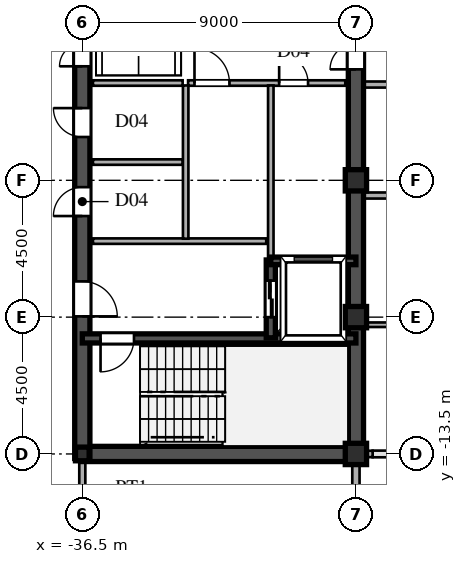
"""IFC4 building model, lengths in metres.
Left out: names, types, materials, properties, quantities, classifications, styles, units other than length and angle.
Written with IfcOpenShell. Run it as: python <this file> out.ifc"""

import sys

from ifc_helpers import new_model, si_unit, direction, frame, frame_2d, origin, origin_2d, place, context, subcontext, project, spatial, rectangle, hollow_rectangle, i_section, extrude, source, transform, mapped, element, fill, save


model = new_model("IFC4")
c1 = context("Model", 3, precision=1e-05, world=origin(), true_north=direction((0.0, 1.0)))
c2 = subcontext(c1, "Body", "Model", "MODEL_VIEW")
j1 = project(units=[si_unit("LENGTHUNIT", "METRE"), si_unit("PLANEANGLEUNIT", "RADIAN")], contexts=[c1])
p1 = place(None, origin())
s1 = spatial("IfcSite", under=j1, at=p1, CompositionType="ELEMENT")
p2 = place(p1, origin())
s2 = spatial("IfcBuilding", under=s1, at=p2, CompositionType="ELEMENT")
p3 = place(p2, frame((0.0, 0.0, 243.15)))
s3 = spatial("IfcBuildingStorey", under=s2, at=p3, CompositionType="ELEMENT", Elevation=243.15)
m1 = source(origin(), c2, "Body", "SweptSolid", [
    extrude(hollow_rectangle(XDim=0.7, YDim=0.7, WallThickness=0.03, at=origin_2d()), origin(), (0.0, 0.0, 1.0), 3.75),
])
for number, where, z_axis, x_axis in (
    (1, (-27.5, -13.5, 0.0), (0.0, 0.0, 1.0), (1.0, 0.0, 0.0)),
    (2, (-27.5, -9.0, 0.0), (0.0, 0.0, 1.0), (1.0, 0.0, 0.0)),
    (3, (-27.5, -4.5, 0.0), (0.0, 0.0, 1.0), (1.0, 0.0, 0.0)),
):
    element("IfcColumn", number, at=place(p3, frame(where, z_axis=z_axis, x_axis=x_axis)), inside=s3, PredefinedType="COLUMN", context=c2, shape_type="MappedRepresentation", body=[
        mapped(m1, transform((0.0, 0.0, 0.0), scale=1.0)),
    ])
m2 = source(origin(), c2, "Body", "SweptSolid", [
    extrude(i_section(OverallWidth=0.45, OverallDepth=0.45, WebThickness=0.016, FlangeThickness=0.025, at=origin_2d()), origin(), (0.0, 0.0, 1.0), 3.75),
])
p4 = place(p3, frame((-36.5, -13.5, 0.0), z_axis=(0.0, 0.0, 1.0), x_axis=(1.0, 0.0, 0.0)))
e4 = element("IfcColumn", 4, at=p4, inside=s3, PredefinedType="COLUMN", context=c2, shape_type="MappedRepresentation", body=[
    mapped(m2, transform((0.0, 0.0, 0.0), scale=1.0)),
])
p5 = place(p3, frame((-27.5, -15.98, 0.0), z_axis=(0.0, 0.0, 1.0), x_axis=(0.0, 1.0, 0.0)))
e5 = element("IfcWall", 5, at=p5, inside=s3, PredefinedType="SOLIDWALL", context=c2, shape_type="SweptSolid", body=[
    extrude(rectangle(XDim=1.605, YDim=0.24, at=frame_2d((0.803, 0.0))), origin(), (0.0, 0.0, 1.0), 3.53),
])
p6 = place(p3, frame((-27.5, -14.375, 0.0), z_axis=(0.0, 0.0, 1.0), x_axis=(0.0, 1.0, 0.0)))
e6 = element("IfcWall", 6, at=p6, inside=s3, PredefinedType="SOLIDWALL", context=c2, shape_type="SweptSolid", body=[
    extrude(rectangle(XDim=0.62, YDim=0.24, at=frame_2d((0.31, 0.0))), origin(), (0.0, 0.0, 1.0), 3.03),
])
p7 = place(p3, frame((-27.49, -13.5, 0.0), z_axis=(0.0, 0.0, 1.0), x_axis=(1.0, 0.0, 0.0)))
e7 = element("IfcWall", 7, at=p7, inside=s3, PredefinedType="SOLIDWALL", context=c2, shape_type="SweptSolid", body=[
    extrude(rectangle(XDim=0.54, YDim=0.21, at=frame_2d((0.27, 0.0))), origin(), (0.0, 0.0, 1.0), 3.03),
])
p8 = place(p3, frame((-27.5, -13.5, 0.0), z_axis=(0.0, 0.0, 1.0), x_axis=(0.0, 1.0, 0.0)))
e8 = element("IfcWall", 8, at=p8, inside=s3, PredefinedType="SHEAR", context=c2, shape_type="SweptSolid", body=[
    extrude(rectangle(XDim=12.2, YDim=0.5, at=frame_2d((6.1, 0.0))), origin(), (0.0, 0.0, 1.0), 3.53),
])
p9 = place(p3, frame((-27.5, -1.3, 0.0), z_axis=(0.0, 0.0, 1.0), x_axis=(0.0, 1.0, 0.0)))
e9 = element("IfcWall", 9, at=p9, inside=s3, PredefinedType="SHEAR", context=c2, shape_type="SweptSolid", body=[
    extrude(rectangle(XDim=2.6, YDim=0.5, at=frame_2d((1.3, 0.0))), origin(), (0.0, 0.0, 1.0), 3.53),
])
p10 = place(p9, frame((0.45, 0.0, 0.0)))
e10 = element("IfcOpeningElement", 10, at=p10, cuts=e9, PredefinedType="OPENING", context=c2, shape_type="SweptSolid", body=[
    extrude(rectangle(XDim=1.7, YDim=2.35, at=frame_2d((0.85, 1.175))), frame((0.0, 0.26, 0.0), z_axis=(0.0, -1.0, 0.0), x_axis=(1.0, 0.0, 0.0)), (0.0, 0.0, 1.0), 0.52),
])
p11 = place(p3, frame((-36.5, -13.5, 0.0), z_axis=(0.0, 0.0, 1.0), x_axis=(1.0, 0.0, 0.0)))
e11 = element("IfcWall", 11, at=p11, inside=s3, PredefinedType="SHEAR", context=c2, shape_type="SweptSolid", body=[
    extrude(rectangle(XDim=9.0, YDim=0.5, at=frame_2d((4.5, 0.0))), origin(), (0.0, 0.0, 1.0), 3.53),
])
p12 = place(p3, frame((-36.5, -13.65, 0.0), z_axis=(0.0, 0.0, 1.0), x_axis=(0.0, 1.0, 0.0)))
e12 = element("IfcWall", 12, at=p12, inside=s3, PredefinedType="SHEAR", context=c2, shape_type="SweptSolid", body=[
    extrude(rectangle(XDim=7.15, YDim=0.5, at=frame_2d((3.575, 0.0))), origin(), (0.0, 0.0, 1.0), 3.53),
])
p13 = place(p12, frame((4.675, 0.0, 0.0)))
e13 = element("IfcOpeningElement", 13, at=p13, cuts=e12, PredefinedType="OPENING", context=c2, shape_type="SweptSolid", body=[
    extrude(rectangle(XDim=1.15, YDim=2.2, at=frame_2d((0.575, 1.1))), frame((0.0, 0.26, 0.0), z_axis=(0.0, -1.0, 0.0), x_axis=(1.0, 0.0, 0.0)), (0.0, 0.0, 1.0), 0.52),
])
p14 = place(p3, frame((-36.5, -1.3, 0.0), z_axis=(0.0, 0.0, 1.0), x_axis=(0.0, 1.0, 0.0)))
e14 = element("IfcWall", 14, at=p14, inside=s3, PredefinedType="SHEAR", context=c2, shape_type="SweptSolid", body=[
    extrude(rectangle(XDim=2.6, YDim=0.5, at=frame_2d((1.3, 0.0))), origin(), (0.0, 0.0, 1.0), 3.53),
])
p15 = place(p14, frame((0.55, 0.0, 0.0)))
e15 = element("IfcOpeningElement", 15, at=p15, cuts=e14, PredefinedType="OPENING", context=c2, shape_type="SweptSolid", body=[
    extrude(rectangle(XDim=1.5, YDim=2.3, at=frame_2d((0.75, 1.15))), frame((0.0, 0.26, 0.0), z_axis=(0.0, -1.0, 0.0), x_axis=(1.0, 0.0, 0.0)), (0.0, 0.0, 1.0), 0.52),
])
p16 = place(p3, frame((-36.5, -6.5, 0.0), z_axis=(0.0, 0.0, 1.0), x_axis=(0.0, 1.0, 0.0)))
e16 = element("IfcWall", 16, at=p16, inside=s3, PredefinedType="SHEAR", context=c2, shape_type="SweptSolid", body=[
    extrude(rectangle(XDim=2.6, YDim=0.5, at=frame_2d((1.3, 0.0))), origin(), (0.0, 0.0, 1.0), 3.53),
])
p17 = place(p16, frame((0.825, 0.0, 0.0)))
e17 = element("IfcOpeningElement", 17, at=p17, cuts=e16, PredefinedType="OPENING", context=c2, shape_type="SweptSolid", body=[
    extrude(rectangle(XDim=0.95, YDim=2.15, at=frame_2d((0.475, 1.075))), frame((0.0, 0.26, 0.0), z_axis=(0.0, -1.0, 0.0), x_axis=(1.0, 0.0, 0.0)), (0.0, 0.0, 1.0), 0.52),
])
p18 = place(p3, frame((-36.5, -3.9, 0.0), z_axis=(0.0, 0.0, 1.0), x_axis=(0.0, 1.0, 0.0)))
e18 = element("IfcWall", 18, at=p18, inside=s3, PredefinedType="SHEAR", context=c2, shape_type="SweptSolid", body=[
    extrude(rectangle(XDim=2.6, YDim=0.5, at=frame_2d((1.3, 0.0))), origin(), (0.0, 0.0, 1.0), 3.53),
])
p19 = place(p18, frame((0.825, 0.0, 0.0)))
e19 = element("IfcOpeningElement", 19, at=p19, cuts=e18, PredefinedType="OPENING", context=c2, shape_type="SweptSolid", body=[
    extrude(rectangle(XDim=0.95, YDim=2.15, at=frame_2d((0.475, 1.075))), frame((0.0, 0.26, 0.0), z_axis=(0.0, -1.0, 0.0), x_axis=(1.0, 0.0, 0.0)), (0.0, 0.0, 1.0), 0.52),
])
p20 = place(p3, frame((-36.5, -9.7, 0.0), z_axis=(0.0, 0.0, 1.0), x_axis=(1.0, 0.0, 0.0)))
e20 = element("IfcWall", 20, at=p20, inside=s3, PredefinedType="SHEAR", context=c2, shape_type="SweptSolid", body=[
    extrude(rectangle(XDim=9.0, YDim=0.3, at=frame_2d((4.5, 0.0))), origin(), (0.0, 0.0, 1.0), 3.53),
])
p21 = place(p20, frame((0.6, 0.0, 0.0)))
e21 = element("IfcOpeningElement", 21, at=p21, cuts=e20, PredefinedType="OPENING", context=c2, shape_type="SweptSolid", body=[
    extrude(rectangle(XDim=1.1, YDim=2.2, at=frame_2d((0.55, 1.1))), frame((0.0, 0.16, 0.0), z_axis=(0.0, -1.0, 0.0), x_axis=(1.0, 0.0, 0.0)), (0.0, 0.0, 1.0), 0.32),
])
p22 = place(p3, frame((-30.3, -7.15, 0.0), z_axis=(0.0, 0.0, 1.0), x_axis=(1.0, 0.0, 0.0)))
e22 = element("IfcWall", 22, at=p22, inside=s3, PredefinedType="SHEAR", context=c2, shape_type="SweptSolid", body=[
    extrude(rectangle(XDim=2.8, YDim=0.25, at=frame_2d((1.4, 0.0))), origin(), (0.0, 0.0, 1.0), 3.53),
])
p23 = place(p3, frame((-30.3, -9.68, 0.0), z_axis=(0.0, 0.0, 1.0), x_axis=(0.0, 1.0, 0.0)))
e23 = element("IfcWall", 23, at=p23, inside=s3, PredefinedType="SHEAR", context=c2, shape_type="SweptSolid", body=[
    extrude(rectangle(XDim=2.56, YDim=0.3, at=frame_2d((1.28, 0.0))), origin(), (0.0, 0.0, 1.0), 3.53),
])
p24 = place(p23, frame((0.68, 0.0, 0.0)))
e24 = element("IfcOpeningElement", 24, at=p24, cuts=e23, PredefinedType="OPENING", context=c2, shape_type="SweptSolid", body=[
    extrude(rectangle(XDim=1.2, YDim=2.25, at=frame_2d((0.6, 1.125))), frame((0.0, 0.16, 0.0), z_axis=(0.0, -1.0, 0.0), x_axis=(1.0, 0.0, 0.0)), (0.0, 0.0, 1.0), 0.32),
])
p25 = place(p3, frame((-36.15, -6.5, 0.0), z_axis=(0.0, 0.0, 1.0), x_axis=(1.0, 0.0, 0.0)))
e25 = element("IfcWall", 25, at=p25, inside=s3, PredefinedType="PARTITIONING", context=c2, shape_type="SweptSolid", body=[
    extrude(rectangle(XDim=5.7, YDim=0.18, at=frame_2d((2.85, 0.0))), origin(), (0.0, 0.0, 1.0), 3.53),
])
p26 = place(p3, frame((-33.1, -6.42, 0.0), z_axis=(0.0, 0.0, 1.0), x_axis=(0.0, 1.0, 0.0)))
e26 = element("IfcWall", 26, at=p26, inside=s3, PredefinedType="PARTITIONING", context=c2, shape_type="SweptSolid", body=[
    extrude(rectangle(XDim=5.04, YDim=0.18, at=frame_2d((2.52, 0.0))), origin(), (0.0, 0.0, 1.0), 3.53),
])
p27 = place(p3, frame((-30.3, -1.3, 0.0), z_axis=(0.0, 0.0, 1.0), x_axis=(1.0, 0.0, 0.0)))
e27 = element("IfcWall", 27, at=p27, inside=s3, PredefinedType="PARTITIONING", context=c2, shape_type="SweptSolid", body=[
    extrude(rectangle(XDim=2.45, YDim=0.18, at=frame_2d((1.225, 0.0))), origin(), (0.0, 0.0, 1.0), 3.53),
])
p28 = place(p27, frame((0.275, 0.0, 0.0)))
e28 = element("IfcOpeningElement", 28, at=p28, cuts=e27, PredefinedType="OPENING", context=c2, shape_type="SweptSolid", body=[
    extrude(rectangle(XDim=0.95, YDim=2.15, at=frame_2d((0.475, 1.075))), frame((0.0, 0.1, 0.0), z_axis=(0.0, -1.0, 0.0), x_axis=(1.0, 0.0, 0.0)), (0.0, 0.0, 1.0), 0.2),
])
p29 = place(p3, frame((-33.02, -1.3, 0.0), z_axis=(0.0, 0.0, 1.0), x_axis=(1.0, 0.0, 0.0)))
e29 = element("IfcWall", 29, at=p29, inside=s3, PredefinedType="PARTITIONING", context=c2, shape_type="SweptSolid", body=[
    extrude(rectangle(XDim=2.72, YDim=0.18, at=frame_2d((1.36, 0.0))), origin(), (0.0, 0.0, 1.0), 3.53),
])
p30 = place(p29, frame((0.21, 0.0, 0.0)))
e30 = element("IfcOpeningElement", 30, at=p30, cuts=e29, PredefinedType="OPENING", context=c2, shape_type="SweptSolid", body=[
    extrude(rectangle(XDim=1.15, YDim=2.2, at=frame_2d((0.575, 1.1))), frame((0.0, 0.1, 0.0), z_axis=(0.0, -1.0, 0.0), x_axis=(1.0, 0.0, 0.0)), (0.0, 0.0, 1.0), 0.2),
])
p31 = place(p3, frame((-30.3, -7.12, 0.0), z_axis=(0.0, 0.0, 1.0), x_axis=(0.0, 1.0, 0.0)))
e31 = element("IfcWall", 31, at=p31, inside=s3, PredefinedType="PARTITIONING", context=c2, shape_type="SweptSolid", body=[
    extrude(rectangle(XDim=5.74, YDim=0.18, at=frame_2d((2.87, 0.0))), origin(), (0.0, 0.0, 1.0), 3.53),
])
for number, where, z_axis, x_axis in (
    (32, (-36.15, -1.3, 0.0), (0.0, 0.0, 1.0), (1.0, 0.0, 0.0)),
    (33, (-36.15, -3.9, 0.0), (0.0, 0.0, 1.0), (1.0, 0.0, 0.0)),
):
    element("IfcWall", number, at=place(p3, frame(where, z_axis=z_axis, x_axis=x_axis)), inside=s3, PredefinedType="PARTITIONING", context=c2, shape_type="SweptSolid", body=[
        extrude(rectangle(XDim=2.95, YDim=0.18, at=frame_2d((1.475, 0.0))), origin(), (0.0, 0.0, 1.0), 3.53),
    ])
p32 = place(p3, frame((-27.245, -9.25, 0.0), z_axis=(0.0, 0.0, 1.0), x_axis=(1.0, 0.0, 0.0)))
e34 = element("IfcWall", 34, at=p32, inside=s3, PredefinedType="PARTITIONING", context=c2, shape_type="SweptSolid", body=[
    extrude(rectangle(XDim=6.66, YDim=0.15, at=frame_2d((3.33, 0.0))), origin(), (0.0, 0.0, 1.0), 3.53),
])
p33 = place(p32, frame((3.07, 0.0, 0.0)))
e35 = element("IfcOpeningElement", 35, at=p33, cuts=e34, PredefinedType="OPENING", context=c2, shape_type="SweptSolid", body=[
    extrude(rectangle(XDim=0.95, YDim=2.15, at=frame_2d((0.475, 1.075))), frame((0.0, 0.085, 0.0), z_axis=(0.0, -1.0, 0.0), x_axis=(1.0, 0.0, 0.0)), (0.0, 0.0, 1.0), 0.17),
])
p34 = place(p3, frame((-27.245, -5.0, 0.0), z_axis=(0.0, 0.0, 1.0), x_axis=(1.0, 0.0, 0.0)))
e36 = element("IfcWall", 36, at=p34, inside=s3, PredefinedType="PARTITIONING", context=c2, shape_type="SweptSolid", body=[
    extrude(rectangle(XDim=54.49, YDim=0.2, at=frame_2d((27.245, 0.0))), origin(), (0.0, 0.0, 1.0), 3.53),
])
p35 = place(p34, frame((23.47, 0.0, 0.0)))
e37 = element("IfcOpeningElement", 37, at=p35, cuts=e36, PredefinedType="OPENING", context=c2, shape_type="SweptSolid", body=[
    extrude(rectangle(XDim=1.05, YDim=2.25, at=frame_2d((0.525, 1.125))), frame((0.0, 0.11, 0.0), z_axis=(0.0, -1.0, 0.0), x_axis=(1.0, 0.0, 0.0)), (0.0, 0.0, 1.0), 0.22),
])
p36 = place(p3, frame((-27.245, -1.35, 0.0), z_axis=(0.0, 0.0, 1.0), x_axis=(1.0, 0.0, 0.0)))
e38 = element("IfcWall", 38, at=p36, inside=s3, PredefinedType="PARTITIONING", context=c2, shape_type="SweptSolid", body=[
    extrude(rectangle(XDim=19.86, YDim=0.2, at=frame_2d((9.93, 0.0))), origin(), (0.0, 0.0, 1.0), 3.53),
])
p37 = place(p36, frame((12.97, 0.0, 0.0)))
e39 = element("IfcOpeningElement", 39, at=p37, cuts=e38, PredefinedType="OPENING", context=c2, shape_type="SweptSolid", body=[
    extrude(rectangle(XDim=1.05, YDim=2.25, at=frame_2d((0.525, 1.125))), frame((0.0, 0.11, 0.0), z_axis=(0.0, -1.0, 0.0), x_axis=(1.0, 0.0, 0.0)), (0.0, 0.0, 1.0), 0.22),
])
p38 = place(p3, frame((-36.5, -15.515, 0.0), z_axis=(0.0, 0.0, 1.0), x_axis=(0.0, 1.0, 0.0)))
e40 = element("IfcWall", 40, at=p38, inside=s3, PredefinedType="PARTITIONING", context=c2, shape_type="SweptSolid", body=[
    extrude(rectangle(XDim=1.76, YDim=0.2, at=frame_2d((0.88, 0.0))), origin(), (0.0, 0.0, 1.0), 2.93),
])
m3 = source(origin(), c2, "Body", "SweptSolid", [
    extrude(rectangle(XDim=1.7, YDim=2.35, at=frame_2d((0.85, 1.175))), frame((0.0, 0.025, 0.0), z_axis=(0.0, -1.0, 0.0), x_axis=(1.0, 0.0, 0.0)), (0.0, 0.0, 1.0), 0.05),
])
p39 = place(p10, origin())
e41 = element("IfcDoor", 41, at=p39, inside=s3, OperationType="DOUBLE_SWING_LEFT", PredefinedType="DOOR", context=c2, shape_type="MappedRepresentation", body=[
    mapped(m3, transform((0.0, 0.0, 0.0), scale=1.0)),
])
fill(e10, e41)
m4 = source(origin(), c2, "Body", "SweptSolid", [
    extrude(rectangle(XDim=1.15, YDim=2.2, at=frame_2d((0.575, 1.1))), frame((0.0, 0.025, 0.0), z_axis=(0.0, -1.0, 0.0), x_axis=(1.0, 0.0, 0.0)), (0.0, 0.0, 1.0), 0.05),
])
p40 = place(p13, frame((1.15, 0.0, 0.0), z_axis=(0.0, 0.0, 1.0), x_axis=(-1.0, 0.0, 0.0)))
e42 = element("IfcDoor", 42, at=p40, inside=s3, OperationType="SINGLE_SWING_LEFT", PredefinedType="DOOR", context=c2, shape_type="MappedRepresentation", body=[
    mapped(m4, transform((0.0, 0.0, 0.0), scale=1.0)),
])
fill(e13, e42)
m5 = source(origin(), c2, "Body", "SweptSolid", [
    extrude(rectangle(XDim=1.5, YDim=2.3, at=frame_2d((0.75, 1.15))), frame((0.0, 0.025, 0.0), z_axis=(0.0, -1.0, 0.0), x_axis=(1.0, 0.0, 0.0)), (0.0, 0.0, 1.0), 0.05),
])
p41 = place(p15, origin())
e43 = element("IfcDoor", 43, at=p41, inside=s3, OperationType="DOUBLE_SWING_LEFT", PredefinedType="DOOR", context=c2, shape_type="MappedRepresentation", body=[
    mapped(m5, transform((0.0, 0.0, 0.0), scale=1.0)),
])
fill(e15, e43)
m6 = source(origin(), c2, "Body", "SweptSolid", [
    extrude(rectangle(XDim=0.95, YDim=2.15, at=frame_2d((0.475, 1.075))), frame((0.0, 0.025, 0.0), z_axis=(0.0, -1.0, 0.0), x_axis=(1.0, 0.0, 0.0)), (0.0, 0.0, 1.0), 0.05),
])
p42 = place(p17, origin())
e44 = element("IfcDoor", 44, at=p42, inside=s3, OperationType="SINGLE_SWING_LEFT", PredefinedType="DOOR", context=c2, shape_type="MappedRepresentation", body=[
    mapped(m6, transform((0.0, 0.0, 0.0), scale=1.0)),
])
fill(e17, e44)
p43 = place(p19, origin())
e45 = element("IfcDoor", 45, at=p43, inside=s3, OperationType="SINGLE_SWING_RIGHT", PredefinedType="DOOR", context=c2, shape_type="MappedRepresentation", body=[
    mapped(m6, transform((0.0, 0.0, 0.0), scale=1.0)),
])
fill(e19, e45)
m7 = source(origin(), c2, "Body", "SweptSolid", [
    extrude(rectangle(XDim=1.1, YDim=2.2, at=frame_2d((0.55, 1.1))), frame((0.0, 0.025, 0.0), z_axis=(0.0, -1.0, 0.0), x_axis=(1.0, 0.0, 0.0)), (0.0, 0.0, 1.0), 0.05),
])
p44 = place(p21, frame((1.1, 0.0, 0.0), z_axis=(0.0, 0.0, 1.0), x_axis=(-1.0, 0.0, 0.0)))
e46 = element("IfcDoor", 46, at=p44, inside=s3, OperationType="SINGLE_SWING_LEFT", PredefinedType="DOOR", context=c2, shape_type="MappedRepresentation", body=[
    mapped(m7, transform((0.0, 0.0, 0.0), scale=1.0)),
])
fill(e21, e46)
m8 = source(origin(), c2, "Body", "SweptSolid", [
    extrude(rectangle(XDim=1.2, YDim=2.25, at=frame_2d((0.6, 1.125))), frame((0.0, 0.025, 0.0), z_axis=(0.0, -1.0, 0.0), x_axis=(1.0, 0.0, 0.0)), (0.0, 0.0, 1.0), 0.05),
])
p45 = place(p24, origin())
e47 = element("IfcDoor", 47, at=p45, inside=s3, OperationType="DOUBLE_DOOR_SLIDING", PredefinedType="DOOR", context=c2, shape_type="MappedRepresentation", body=[
    mapped(m8, transform((0.0, 0.0, 0.0), scale=1.0)),
])
fill(e24, e47)
p46 = place(p28, origin())
e48 = element("IfcDoor", 48, at=p46, inside=s3, OperationType="SINGLE_SWING_LEFT", PredefinedType="DOOR", context=c2, shape_type="MappedRepresentation", body=[
    mapped(m6, transform((0.0, 0.0, 0.0), scale=1.0)),
])
fill(e28, e48)
p47 = place(p30, origin())
e49 = element("IfcDoor", 49, at=p47, inside=s3, OperationType="SINGLE_SWING_LEFT", PredefinedType="DOOR", context=c2, shape_type="MappedRepresentation", body=[
    mapped(m4, transform((0.0, 0.0, 0.0), scale=1.0)),
])
fill(e30, e49)
save(model, sys.argv[1])
